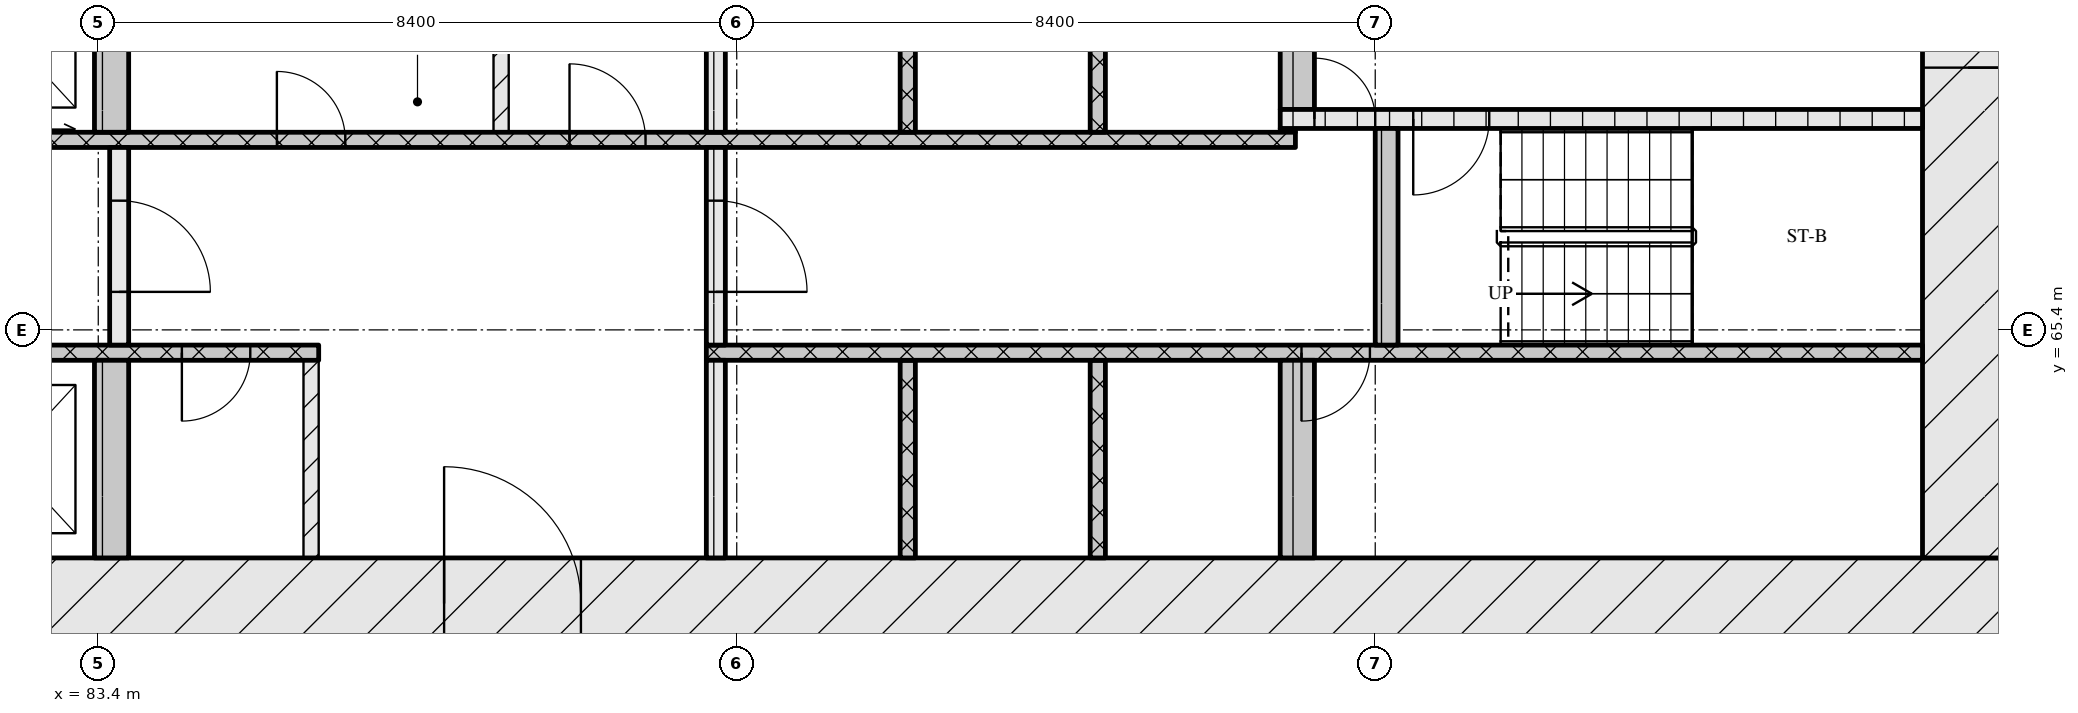
"""IFC4 building model, lengths in metres.
Left out: names, types, materials, properties, quantities, classifications, styles, units other than length and angle.
Written with IfcOpenShell. Run it as: python <this file> out.ifc"""

import sys

from ifc_helpers import new_model, si_unit, direction, frame, frame_2d, origin, place, context, subcontext, project, spatial, rectangle, extrude, element, fill, save


model = new_model("IFC4")
c1 = context("Model", 3, precision=1e-05, world=origin(), true_north=direction((0.0, 1.0)))
c2 = subcontext(c1, "Body", "Model", "MODEL_VIEW")
j1 = project(units=[si_unit("LENGTHUNIT", "METRE"), si_unit("PLANEANGLEUNIT", "RADIAN")], contexts=[c1])
p1 = place(None, origin())
s1 = spatial("IfcSite", under=j1, at=p1, CompositionType="ELEMENT")
p2 = place(p1, origin())
s2 = spatial("IfcBuilding", under=s1, at=p2, CompositionType="ELEMENT")
p3 = place(p2, frame((0.0, 0.0, 48.0)))
s3 = spatial("IfcBuildingStorey", under=s2, at=p3, CompositionType="ELEMENT", Elevation=48.0)
p4 = place(p3, frame((66.6, 61.8, 0.0), z_axis=(0.0, 0.0, 1.0), x_axis=(1.0, 0.0, 0.0)))
e1 = element("IfcWall", 1, at=p4, inside=s3, PredefinedType="SOLIDWALL", context=c2, shape_type="SweptSolid", body=[
    extrude(rectangle(XDim=42.0, YDim=1.2, at=frame_2d((21.0, 0.0))), origin(), (0.0, 0.0, 1.0), 3.32),
])
p5 = place(p4, frame((21.35, 0.0, 0.0)))
e2 = element("IfcOpeningElement", 2, at=p5, cuts=e1, PredefinedType="OPENING", context=c2, shape_type="SweptSolid", body=[
    extrude(rectangle(XDim=1.8, YDim=2.1, at=frame_2d((0.9, 1.05))), frame((0.0, 0.61, 0.0), z_axis=(0.0, -1.0, 0.0), x_axis=(1.0, 0.0, 0.0)), (0.0, 0.0, 1.0), 1.22),
])
p6 = place(p3, frame((108.0, 62.4, 0.0), z_axis=(0.0, 0.0, 1.0), x_axis=(0.0, 1.0, 0.0)))
e3 = element("IfcWall", 3, at=p6, inside=s3, PredefinedType="SOLIDWALL", context=c2, shape_type="SweptSolid", body=[
    extrude(rectangle(XDim=12.0, YDim=1.2, at=frame_2d((6.0, 0.0))), origin(), (0.0, 0.0, 1.0), 3.32),
])
p7 = place(p6, frame((6.45, 0.0, 0.0)))
e4 = element("IfcOpeningElement", 4, at=p7, cuts=e3, PredefinedType="OPENING", context=c2, shape_type="SweptSolid", body=[
    extrude(rectangle(XDim=1.2, YDim=2.1, at=frame_2d((0.6, 1.05))), frame((0.0, 0.61, 0.0), z_axis=(0.0, -1.0, 0.0), x_axis=(1.0, 0.0, 0.0)), (0.0, 0.0, 1.0), 1.22),
])
p8 = place(p3, frame((83.575, 62.4, 0.0), z_axis=(0.0, 0.0, 1.0), x_axis=(0.0, 1.0, 0.0)))
e5 = element("IfcWall", 5, at=p8, inside=s3, PredefinedType="SOLIDWALL", context=c2, shape_type="SweptSolid", body=[
    extrude(rectangle(XDim=2.6, YDim=0.45, at=frame_2d((1.3, 0.0))), origin(), (0.0, 0.0, 1.0), 3.32),
])
p9 = place(p3, frame((86.2, 62.4, 0.0), z_axis=(0.0, 0.0, 1.0), x_axis=(0.0, 1.0, 0.0)))
e6 = element("IfcWall", 6, at=p9, inside=s3, PredefinedType="PARTITIONING", context=c2, shape_type="SweptSolid", body=[
    extrude(rectangle(XDim=2.6, YDim=0.2, at=frame_2d((1.3, 0.0))), origin(), (0.0, 0.0, 1.0), 3.32),
])
p10 = place(p3, frame((91.525, 62.4, 0.0), z_axis=(0.0, 0.0, 1.0), x_axis=(0.0, 1.0, 0.0)))
e7 = element("IfcWall", 7, at=p10, inside=s3, PredefinedType="SOLIDWALL", context=c2, shape_type="SweptSolid", body=[
    extrude(rectangle(XDim=2.6, YDim=0.25, at=frame_2d((1.3, 0.0))), origin(), (0.0, 0.0, 1.0), 3.32),
])
for number, where, z_axis, x_axis in (
    (8, (94.05, 62.4, 0.0), (0.0, 0.0, 1.0), (0.0, 1.0, 0.0)),
    (9, (96.55, 62.4, 0.0), (0.0, 0.0, 1.0), (0.0, 1.0, 0.0)),
):
    element("IfcWall", number, at=place(p3, frame(where, z_axis=z_axis, x_axis=x_axis)), inside=s3, PredefinedType="SOLIDWALL", context=c2, shape_type="SweptSolid", body=[
        extrude(rectangle(XDim=2.6, YDim=0.2, at=frame_2d((1.3, 0.0))), origin(), (0.0, 0.0, 1.0), 3.32),
    ])
p11 = place(p3, frame((99.175, 62.4, 0.0), z_axis=(0.0, 0.0, 1.0), x_axis=(0.0, 1.0, 0.0)))
e10 = element("IfcWall", 10, at=p11, inside=s3, PredefinedType="SOLIDWALL", context=c2, shape_type="SweptSolid", body=[
    extrude(rectangle(XDim=2.6, YDim=0.45, at=frame_2d((1.3, 0.0))), origin(), (0.0, 0.0, 1.0), 3.32),
])
p12 = place(p3, frame((67.8, 65.1, 0.0), z_axis=(0.0, 0.0, 1.0), x_axis=(1.0, 0.0, 0.0)))
e11 = element("IfcWall", 11, at=p12, inside=s3, PredefinedType="SOLIDWALL", context=c2, shape_type="SweptSolid", body=[
    extrude(rectangle(XDim=18.5, YDim=0.2, at=frame_2d((9.25, 0.0))), origin(), (0.0, 0.0, 1.0), 3.32),
])
p13 = place(p12, frame((7.27, 0.0, 0.0)))
e12 = element("IfcOpeningElement", 12, at=p13, cuts=e11, PredefinedType="OPENING", context=c2, shape_type="SweptSolid", body=[
    extrude(rectangle(XDim=0.9, YDim=2.1, at=frame_2d((0.45, 1.05))), frame((0.0, 0.11, 0.0), z_axis=(0.0, -1.0, 0.0), x_axis=(1.0, 0.0, 0.0)), (0.0, 0.0, 1.0), 0.22),
])
p14 = place(p12, frame((8.85, 0.0, 0.0)))
e13 = element("IfcOpeningElement", 13, at=p14, cuts=e11, PredefinedType="OPENING", context=c2, shape_type="SweptSolid", body=[
    extrude(rectangle(XDim=1.1, YDim=2.1, at=frame_2d((0.55, 1.05))), frame((0.0, 0.11, 0.0), z_axis=(0.0, -1.0, 0.0), x_axis=(1.0, 0.0, 0.0)), (0.0, 0.0, 1.0), 0.22),
])
p15 = place(p12, frame((11.35, 0.0, 0.0)))
e14 = element("IfcOpeningElement", 14, at=p15, cuts=e11, PredefinedType="OPENING", context=c2, shape_type="SweptSolid", body=[
    extrude(rectangle(XDim=1.1, YDim=2.1, at=frame_2d((0.55, 1.05))), frame((0.0, 0.11, 0.0), z_axis=(0.0, -1.0, 0.0), x_axis=(1.0, 0.0, 0.0)), (0.0, 0.0, 1.0), 0.22),
])
p16 = place(p12, frame((13.85, 0.0, 0.0)))
e15 = element("IfcOpeningElement", 15, at=p16, cuts=e11, PredefinedType="OPENING", context=c2, shape_type="SweptSolid", body=[
    extrude(rectangle(XDim=1.1, YDim=2.1, at=frame_2d((0.55, 1.05))), frame((0.0, 0.11, 0.0), z_axis=(0.0, -1.0, 0.0), x_axis=(1.0, 0.0, 0.0)), (0.0, 0.0, 1.0), 0.22),
])
p17 = place(p12, frame((16.7, 0.0, 0.0)))
e16 = element("IfcOpeningElement", 16, at=p17, cuts=e11, PredefinedType="OPENING", context=c2, shape_type="SweptSolid", body=[
    extrude(rectangle(XDim=0.9, YDim=2.1, at=frame_2d((0.45, 1.05))), frame((0.0, 0.11, 0.0), z_axis=(0.0, -1.0, 0.0), x_axis=(1.0, 0.0, 0.0)), (0.0, 0.0, 1.0), 0.22),
])
p18 = place(p3, frame((91.4, 65.1, 0.0), z_axis=(0.0, 0.0, 1.0), x_axis=(1.0, 0.0, 0.0)))
e17 = element("IfcWall", 17, at=p18, inside=s3, PredefinedType="SOLIDWALL", context=c2, shape_type="SweptSolid", body=[
    extrude(rectangle(XDim=16.0, YDim=0.2, at=frame_2d((8.0, 0.0))), origin(), (0.0, 0.0, 1.0), 3.32),
])
p19 = place(p18, frame((7.83, 0.0, 0.0)))
e18 = element("IfcOpeningElement", 18, at=p19, cuts=e17, PredefinedType="OPENING", context=c2, shape_type="SweptSolid", body=[
    extrude(rectangle(XDim=0.9, YDim=2.1, at=frame_2d((0.45, 1.05))), frame((0.0, 0.11, 0.0), z_axis=(0.0, -1.0, 0.0), x_axis=(1.0, 0.0, 0.0)), (0.0, 0.0, 1.0), 0.22),
])
p20 = place(p3, frame((83.675, 65.2, 0.0), z_axis=(0.0, 0.0, 1.0), x_axis=(0.0, 1.0, 0.0)))
e19 = element("IfcWall", 19, at=p20, inside=s3, PredefinedType="SOLIDWALL", context=c2, shape_type="SweptSolid", body=[
    extrude(rectangle(XDim=2.6, YDim=0.25, at=frame_2d((1.3, 0.0))), origin(), (0.0, 0.0, 1.0), 3.32),
])
p21 = place(p20, frame((0.7, 0.0, 0.0)))
e20 = element("IfcOpeningElement", 20, at=p21, cuts=e19, PredefinedType="OPENING", context=c2, shape_type="SweptSolid", body=[
    extrude(rectangle(XDim=1.2, YDim=2.1, at=frame_2d((0.6, 1.05))), frame((0.0, 0.135, 0.0), z_axis=(0.0, -1.0, 0.0), x_axis=(1.0, 0.0, 0.0)), (0.0, 0.0, 1.0), 0.27),
])
p22 = place(p3, frame((91.525, 65.2, 0.0), z_axis=(0.0, 0.0, 1.0), x_axis=(0.0, 1.0, 0.0)))
e21 = element("IfcWall", 21, at=p22, inside=s3, PredefinedType="SOLIDWALL", context=c2, shape_type="SweptSolid", body=[
    extrude(rectangle(XDim=2.6, YDim=0.25, at=frame_2d((1.3, 0.0))), origin(), (0.0, 0.0, 1.0), 3.32),
])
p23 = place(p22, frame((0.7, 0.0, 0.0)))
e22 = element("IfcOpeningElement", 22, at=p23, cuts=e21, PredefinedType="OPENING", context=c2, shape_type="SweptSolid", body=[
    extrude(rectangle(XDim=1.2, YDim=2.1, at=frame_2d((0.6, 1.05))), frame((0.0, 0.135, 0.0), z_axis=(0.0, -1.0, 0.0), x_axis=(1.0, 0.0, 0.0)), (0.0, 0.0, 1.0), 0.27),
])
p24 = place(p3, frame((100.35, 65.2, 0.0), z_axis=(0.0, 0.0, 1.0), x_axis=(0.0, 1.0, 0.0)))
e23 = element("IfcWall", 23, at=p24, inside=s3, PredefinedType="SOLIDWALL", context=c2, shape_type="SweptSolid", body=[
    extrude(rectangle(XDim=2.85, YDim=0.3, at=frame_2d((1.425, 0.0))), origin(), (0.0, 0.0, 1.0), 3.32),
])
p25 = place(p3, frame((76.05, 67.9, 0.0), z_axis=(0.0, 0.0, 1.0), x_axis=(1.0, 0.0, 0.0)))
e24 = element("IfcWall", 24, at=p25, inside=s3, PredefinedType="SOLIDWALL", context=c2, shape_type="SweptSolid", body=[
    extrude(rectangle(XDim=23.1, YDim=0.2, at=frame_2d((11.55, 0.0))), origin(), (0.0, 0.0, 1.0), 3.32),
])
p26 = place(p25, frame((0.6, 0.0, 0.0)))
e25 = element("IfcOpeningElement", 25, at=p26, cuts=e24, PredefinedType="OPENING", context=c2, shape_type="SweptSolid", body=[
    extrude(rectangle(XDim=1.1, YDim=2.1, at=frame_2d((0.55, 1.05))), frame((0.0, 0.11, 0.0), z_axis=(0.0, -1.0, 0.0), x_axis=(1.0, 0.0, 0.0)), (0.0, 0.0, 1.0), 0.22),
])
p27 = place(p25, frame((3.1, 0.0, 0.0)))
e26 = element("IfcOpeningElement", 26, at=p27, cuts=e24, PredefinedType="OPENING", context=c2, shape_type="SweptSolid", body=[
    extrude(rectangle(XDim=1.1, YDim=2.1, at=frame_2d((0.55, 1.05))), frame((0.0, 0.11, 0.0), z_axis=(0.0, -1.0, 0.0), x_axis=(1.0, 0.0, 0.0)), (0.0, 0.0, 1.0), 0.22),
])
p28 = place(p25, frame((5.6, 0.0, 0.0)))
e27 = element("IfcOpeningElement", 27, at=p28, cuts=e24, PredefinedType="OPENING", context=c2, shape_type="SweptSolid", body=[
    extrude(rectangle(XDim=1.1, YDim=2.1, at=frame_2d((0.55, 1.05))), frame((0.0, 0.11, 0.0), z_axis=(0.0, -1.0, 0.0), x_axis=(1.0, 0.0, 0.0)), (0.0, 0.0, 1.0), 0.22),
])
p29 = place(p25, frame((9.7, 0.0, 0.0)))
e28 = element("IfcOpeningElement", 28, at=p29, cuts=e24, PredefinedType="OPENING", context=c2, shape_type="SweptSolid", body=[
    extrude(rectangle(XDim=0.9, YDim=2.1, at=frame_2d((0.45, 1.05))), frame((0.0, 0.11, 0.0), z_axis=(0.0, -1.0, 0.0), x_axis=(1.0, 0.0, 0.0)), (0.0, 0.0, 1.0), 0.22),
])
p30 = place(p25, frame((13.55, 0.0, 0.0)))
e29 = element("IfcOpeningElement", 29, at=p30, cuts=e24, PredefinedType="OPENING", context=c2, shape_type="SweptSolid", body=[
    extrude(rectangle(XDim=1.0, YDim=2.1, at=frame_2d((0.5, 1.05))), frame((0.0, 0.11, 0.0), z_axis=(0.0, -1.0, 0.0), x_axis=(1.0, 0.0, 0.0)), (0.0, 0.0, 1.0), 0.22),
])
p31 = place(p3, frame((83.575, 68.0, 0.0), z_axis=(0.0, 0.0, 1.0), x_axis=(0.0, 1.0, 0.0)))
e30 = element("IfcWall", 30, at=p31, inside=s3, PredefinedType="SOLIDWALL", context=c2, shape_type="SweptSolid", body=[
    extrude(rectangle(XDim=2.6, YDim=0.45, at=frame_2d((1.3, 0.0))), origin(), (0.0, 0.0, 1.0), 3.32),
])
p32 = place(p3, frame((88.7, 68.0, 0.0), z_axis=(0.0, 0.0, 1.0), x_axis=(0.0, 1.0, 0.0)))
e31 = element("IfcWall", 31, at=p32, inside=s3, PredefinedType="PARTITIONING", context=c2, shape_type="SweptSolid", body=[
    extrude(rectangle(XDim=2.6, YDim=0.2, at=frame_2d((1.3, 0.0))), origin(), (0.0, 0.0, 1.0), 3.32),
])
p33 = place(p3, frame((91.525, 68.0, 0.0), z_axis=(0.0, 0.0, 1.0), x_axis=(0.0, 1.0, 0.0)))
e32 = element("IfcWall", 32, at=p33, inside=s3, PredefinedType="SOLIDWALL", context=c2, shape_type="SweptSolid", body=[
    extrude(rectangle(XDim=2.6, YDim=0.25, at=frame_2d((1.3, 0.0))), origin(), (0.0, 0.0, 1.0), 3.32),
])
for number, where, z_axis, x_axis in (
    (33, (94.05, 68.0, 0.0), (0.0, 0.0, 1.0), (0.0, 1.0, 0.0)),
    (34, (96.55, 68.0, 0.0), (0.0, 0.0, 1.0), (0.0, 1.0, 0.0)),
):
    element("IfcWall", number, at=place(p3, frame(where, z_axis=z_axis, x_axis=x_axis)), inside=s3, PredefinedType="SOLIDWALL", context=c2, shape_type="SweptSolid", body=[
        extrude(rectangle(XDim=2.6, YDim=0.2, at=frame_2d((1.3, 0.0))), origin(), (0.0, 0.0, 1.0), 3.32),
    ])
p34 = place(p3, frame((98.95, 68.025, 0.0), z_axis=(0.0, 0.0, 1.0), x_axis=(1.0, 0.0, 0.0)))
e35 = element("IfcWall", 35, at=p34, inside=s3, PredefinedType="SOLIDWALL", context=c2, shape_type="SweptSolid", body=[
    extrude(rectangle(XDim=0.2, YDim=0.05, at=frame_2d((0.1, 0.0))), origin(), (0.0, 0.0, 1.0), 3.32),
])
p35 = place(p3, frame((98.95, 68.175, 0.0), z_axis=(0.0, 0.0, 1.0), x_axis=(1.0, 0.0, 0.0)))
e36 = element("IfcWall", 36, at=p35, inside=s3, PredefinedType="SOLIDWALL", context=c2, shape_type="SweptSolid", body=[
    extrude(rectangle(XDim=8.45, YDim=0.25, at=frame_2d((4.225, 0.0))), origin(), (0.0, 0.0, 1.0), 3.32),
])
p36 = place(p35, frame((0.45, 0.0, 0.0)))
e37 = element("IfcOpeningElement", 37, at=p36, cuts=e36, PredefinedType="OPENING", context=c2, shape_type="SweptSolid", body=[
    extrude(rectangle(XDim=0.8, YDim=2.1, at=frame_2d((0.4, 1.05))), frame((0.0, 0.135, 0.0), z_axis=(0.0, -1.0, 0.0), x_axis=(1.0, 0.0, 0.0)), (0.0, 0.0, 1.0), 0.27),
])
p37 = place(p35, frame((1.75, 0.0, 0.0)))
e38 = element("IfcOpeningElement", 38, at=p37, cuts=e36, PredefinedType="OPENING", context=c2, shape_type="SweptSolid", body=[
    extrude(rectangle(XDim=1.0, YDim=2.1, at=frame_2d((0.5, 1.05))), frame((0.0, 0.135, 0.0), z_axis=(0.0, -1.0, 0.0), x_axis=(1.0, 0.0, 0.0)), (0.0, 0.0, 1.0), 0.27),
])
p38 = place(p3, frame((99.175, 68.3, 0.0), z_axis=(0.0, 0.0, 1.0), x_axis=(0.0, 1.0, 0.0)))
e39 = element("IfcWall", 39, at=p38, inside=s3, PredefinedType="SOLIDWALL", context=c2, shape_type="SweptSolid", body=[
    extrude(rectangle(XDim=2.3, YDim=0.45, at=frame_2d((1.15, 0.0))), origin(), (0.0, 0.0, 1.0), 3.32),
])
p39 = place(p5, origin())
e40 = element("IfcDoor", 40, at=p39, inside=s3, OperationType="DOUBLE_DOOR_SINGLE_SWING", PredefinedType="DOOR", context=c2, shape_type="SweptSolid", body=[
    extrude(rectangle(XDim=1.8, YDim=2.1, at=frame_2d((0.9, 1.05))), frame((0.0, 0.025, 0.0), z_axis=(0.0, -1.0, 0.0), x_axis=(1.0, 0.0, 0.0)), (0.0, 0.0, 1.0), 0.05),
])
fill(e2, e40)
p40 = place(p17, origin())
e41 = element("IfcDoor", 41, at=p40, inside=s3, OperationType="SINGLE_SWING_RIGHT", PredefinedType="DOOR", context=c2, shape_type="SweptSolid", body=[
    extrude(rectangle(XDim=0.9, YDim=2.1, at=frame_2d((0.45, 1.05))), frame((0.0, 0.025, 0.0), z_axis=(0.0, -1.0, 0.0), x_axis=(1.0, 0.0, 0.0)), (0.0, 0.0, 1.0), 0.05),
])
fill(e16, e41)
p41 = place(p19, origin())
e42 = element("IfcDoor", 42, at=p41, inside=s3, OperationType="SINGLE_SWING_RIGHT", PredefinedType="DOOR", context=c2, shape_type="SweptSolid", body=[
    extrude(rectangle(XDim=0.9, YDim=2.1, at=frame_2d((0.45, 1.05))), frame((0.0, 0.025, 0.0), z_axis=(0.0, -1.0, 0.0), x_axis=(1.0, 0.0, 0.0)), (0.0, 0.0, 1.0), 0.05),
])
fill(e18, e42)
p42 = place(p21, origin())
e43 = element("IfcDoor", 43, at=p42, inside=s3, OperationType="SINGLE_SWING_RIGHT", PredefinedType="DOOR", context=c2, shape_type="SweptSolid", body=[
    extrude(rectangle(XDim=1.2, YDim=2.1, at=frame_2d((0.6, 1.05))), frame((0.0, 0.025, 0.0), z_axis=(0.0, -1.0, 0.0), x_axis=(1.0, 0.0, 0.0)), (0.0, 0.0, 1.0), 0.05),
])
fill(e20, e43)
p43 = place(p23, origin())
e44 = element("IfcDoor", 44, at=p43, inside=s3, OperationType="SINGLE_SWING_RIGHT", PredefinedType="DOOR", context=c2, shape_type="SweptSolid", body=[
    extrude(rectangle(XDim=1.2, YDim=2.1, at=frame_2d((0.6, 1.05))), frame((0.0, 0.025, 0.0), z_axis=(0.0, -1.0, 0.0), x_axis=(1.0, 0.0, 0.0)), (0.0, 0.0, 1.0), 0.05),
])
fill(e22, e44)
p44 = place(p29, origin())
e45 = element("IfcDoor", 45, at=p44, inside=s3, OperationType="SINGLE_SWING_LEFT", PredefinedType="DOOR", context=c2, shape_type="SweptSolid", body=[
    extrude(rectangle(XDim=0.9, YDim=2.1, at=frame_2d((0.45, 1.05))), frame((0.0, 0.025, 0.0), z_axis=(0.0, -1.0, 0.0), x_axis=(1.0, 0.0, 0.0)), (0.0, 0.0, 1.0), 0.05),
])
fill(e28, e45)
p45 = place(p30, origin())
e46 = element("IfcDoor", 46, at=p45, inside=s3, OperationType="SINGLE_SWING_LEFT", PredefinedType="DOOR", context=c2, shape_type="SweptSolid", body=[
    extrude(rectangle(XDim=1.0, YDim=2.1, at=frame_2d((0.5, 1.05))), frame((0.0, 0.025, 0.0), z_axis=(0.0, -1.0, 0.0), x_axis=(1.0, 0.0, 0.0)), (0.0, 0.0, 1.0), 0.05),
])
fill(e29, e46)
p46 = place(p36, origin())
e47 = element("IfcDoor", 47, at=p46, inside=s3, OperationType="SINGLE_SWING_LEFT", PredefinedType="DOOR", context=c2, shape_type="SweptSolid", body=[
    extrude(rectangle(XDim=0.8, YDim=2.1, at=frame_2d((0.4, 1.05))), frame((0.0, 0.025, 0.0), z_axis=(0.0, -1.0, 0.0), x_axis=(1.0, 0.0, 0.0)), (0.0, 0.0, 1.0), 0.05),
])
fill(e37, e47)
p47 = place(p37, origin())
e48 = element("IfcDoor", 48, at=p47, inside=s3, OperationType="SINGLE_SWING_RIGHT", PredefinedType="DOOR", context=c2, shape_type="SweptSolid", body=[
    extrude(rectangle(XDim=1.0, YDim=2.1, at=frame_2d((0.5, 1.05))), frame((0.0, 0.025, 0.0), z_axis=(0.0, -1.0, 0.0), x_axis=(1.0, 0.0, 0.0)), (0.0, 0.0, 1.0), 0.05),
])
fill(e38, e48)
p48 = place(p7, origin())
e49 = element("IfcDoor", 49, at=p48, inside=s3, OperationType="SINGLE_SWING_RIGHT", PredefinedType="DOOR", context=c2, shape_type="SweptSolid", body=[
    extrude(rectangle(XDim=1.2, YDim=2.1, at=frame_2d((0.6, 1.05))), frame((0.0, 0.025, 0.0), z_axis=(0.0, -1.0, 0.0), x_axis=(1.0, 0.0, 0.0)), (0.0, 0.0, 1.0), 0.05),
])
fill(e4, e49)
save(model, sys.argv[1])
